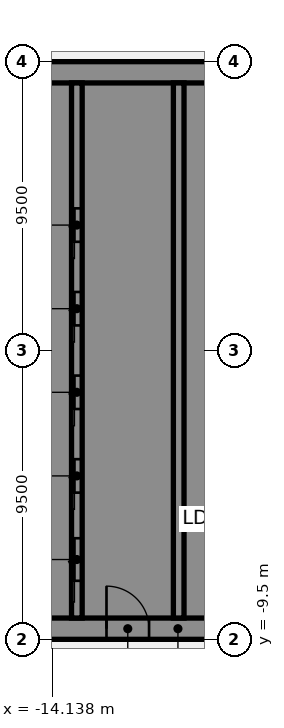
"""IFC4 building model, lengths in metres.
Left out: names, types, materials, properties, quantities, classifications, styles, units other than length and angle.
Written with IfcOpenShell. Run it as: python <this file> out.ifc"""

import sys

from ifc_helpers import new_model, si_unit, direction, frame, frame_2d, origin, place, context, subcontext, project, spatial, polyline, rectangle, outline, extrude, element, fill, save


model = new_model("IFC4")
c1 = context("Model", 3, precision=1e-05, world=origin(), true_north=direction((0.0, 1.0)))
c2 = subcontext(c1, "Body", "Model", "MODEL_VIEW")
j1 = project(units=[si_unit("LENGTHUNIT", "METRE"), si_unit("PLANEANGLEUNIT", "RADIAN")], contexts=[c1])
p1 = place(None, origin())
s1 = spatial("IfcSite", under=j1, at=p1, CompositionType="ELEMENT")
p2 = place(p1, origin())
s2 = spatial("IfcBuilding", under=s1, at=p2, CompositionType="ELEMENT")
p3 = place(p2, frame((0.0, 0.0, 15.0)))
s3 = spatial("IfcBuildingStorey", under=s2, at=p3, CompositionType="ELEMENT", Elevation=15.0)
p4 = place(p3, frame((-16.5, -9.15, 0.0), z_axis=(0.0, 0.0, 1.0), x_axis=(1.0, 0.0, 0.0)))
e1 = element("IfcWall", 1, at=p4, inside=s3, PredefinedType="SHEAR", context=c2, shape_type="SweptSolid", body=[
    extrude(rectangle(XDim=13.0, YDim=0.7, at=frame_2d((6.5, 0.0))), origin(), (0.0, 0.0, 1.0), 4.5),
])
p5 = place(p4, frame((4.15, 0.0, 0.0)))
e2 = element("IfcOpeningElement", 2, at=p5, cuts=e1, PredefinedType="OPENING", context=c2, shape_type="SweptSolid", body=[
    extrude(rectangle(XDim=1.4, YDim=2.1, at=frame_2d((0.7, 1.05))), frame((0.0, 0.36, 0.0), z_axis=(0.0, -1.0, 0.0), x_axis=(1.0, 0.0, 0.0)), (0.0, 0.0, 1.0), 0.72),
])
p6 = place(p4, frame((10.125, 0.0, 0.0)))
e3 = element("IfcOpeningElement", 3, at=p6, cuts=e1, PredefinedType="OPENING", context=c2, shape_type="SweptSolid", body=[
    extrude(rectangle(XDim=1.4, YDim=2.1, at=frame_2d((0.7, 1.05))), frame((0.0, 0.36, 0.0), z_axis=(0.0, -1.0, 0.0), x_axis=(1.0, 0.0, 0.0)), (0.0, 0.0, 1.0), 0.72),
])
p7 = place(p3, origin())
e4 = element("IfcWall", 4, at=p7, inside=s3, PredefinedType="SHEAR", context=c2, shape_type="SweptSolid", body=[
    extrude(outline(polyline([(-13.5, -8.8), (-13.5, -8.125), (-15.8, -8.125), (-15.8, -5.625), (-13.5, -5.625), (-13.5, -5.375), (-15.8, -5.375), (-15.8, -2.875), (-13.5, -2.875), (-13.5, -2.625), (-15.8, -2.625), (-15.8, -0.125), (-13.5, -0.125), (-13.5, 0.125), (-15.8, 0.125), (-15.8, 2.625), (-13.5, 2.625), (-13.5, 2.875), (-15.8, 2.875), (-15.8, 5.375), (-13.5, 5.375), (-13.5, 5.625), (-15.8, 5.625), (-15.8, 8.125), (-13.5, 8.125), (-13.5, 8.8), (-15.8, 8.8), (-16.5, 8.8), (-16.5, -8.8), (-15.8, -8.8), (-13.5, -8.8)])), origin(), (0.0, 0.0, 1.0), 4.5),
])
p8 = place(p3, frame((-16.5, 9.15, 0.0), z_axis=(0.0, 0.0, 1.0), x_axis=(1.0, 0.0, 0.0)))
e5 = element("IfcWall", 5, at=p8, inside=s3, PredefinedType="SHEAR", context=c2, shape_type="SweptSolid", body=[
    extrude(rectangle(XDim=13.0, YDim=0.7, at=frame_2d((6.5, 0.0))), origin(), (0.0, 0.0, 1.0), 4.5),
])
p9 = place(p3, origin())
e6 = element("IfcWall", 6, at=p9, inside=s3, PredefinedType="SHEAR", context=c2, shape_type="SweptSolid", body=[
    extrude(outline(polyline([(-9.8, -5.375), (-9.8, -5.625), (-7.5, -5.625), (-7.15, -5.625), (-7.15, 8.8), (-7.5, 8.8), (-9.8, 8.8), (-9.8, 8.125), (-7.5, 8.125), (-7.5, 5.625), (-9.8, 5.625), (-9.8, 5.375), (-7.5, 5.375), (-7.5, 2.875), (-9.8, 2.875), (-9.8, 2.625), (-7.5, 2.625), (-7.5, 0.125), (-9.8, 0.125), (-9.8, -0.125), (-7.5, -0.125), (-7.5, -2.625), (-9.8, -2.625), (-9.8, -2.875), (-7.5, -2.875), (-7.5, -5.375), (-9.8, -5.375)])), origin(), (0.0, 0.0, 1.0), 4.5),
])
p10 = place(p3, origin())
e7 = element("IfcWall", 7, at=p10, inside=s3, PredefinedType="SHEAR", context=c2, shape_type="SweptSolid", body=[
    extrude(outline(polyline([(-7.5, -8.125), (-9.55, -8.125), (-9.55, -5.625), (-9.8, -5.625), (-9.8, -8.125), (-9.8, -8.8), (-7.5, -8.8), (-7.5, -8.125)])), origin(), (0.0, 0.0, 1.0), 4.5),
])
p11 = place(p3, frame((-13.325, -8.8, 0.0), z_axis=(0.0, 0.0, 1.0), x_axis=(0.0, 1.0, 0.0)))
e8 = element("IfcWall", 8, at=p11, inside=s3, PredefinedType="SHEAR", context=c2, shape_type="SweptSolid", body=[
    extrude(rectangle(XDim=17.6, YDim=0.35, at=frame_2d((8.8, 0.0))), origin(), (0.0, 0.0, 1.0), 4.5),
])
p12 = place(p11, frame((1.225, 0.0, 0.0)))
e9 = element("IfcOpeningElement", 9, at=p12, cuts=e8, PredefinedType="OPENING", context=c2, shape_type="SweptSolid", body=[
    extrude(rectangle(XDim=1.4, YDim=2.1, at=frame_2d((0.7, 1.05))), frame((0.0, 0.185, 0.0), z_axis=(0.0, -1.0, 0.0), x_axis=(1.0, 0.0, 0.0)), (0.0, 0.0, 1.0), 0.37),
])
p13 = place(p11, frame((4.125, 0.0, 0.0)))
e10 = element("IfcOpeningElement", 10, at=p13, cuts=e8, PredefinedType="OPENING", context=c2, shape_type="SweptSolid", body=[
    extrude(rectangle(XDim=1.1, YDim=2.1, at=frame_2d((0.55, 1.05))), frame((0.0, 0.185, 0.0), z_axis=(0.0, -1.0, 0.0), x_axis=(1.0, 0.0, 0.0)), (0.0, 0.0, 1.0), 0.37),
])
p14 = place(p11, frame((6.875, 0.0, 0.0)))
e11 = element("IfcOpeningElement", 11, at=p14, cuts=e8, PredefinedType="OPENING", context=c2, shape_type="SweptSolid", body=[
    extrude(rectangle(XDim=1.1, YDim=2.1, at=frame_2d((0.55, 1.05))), frame((0.0, 0.185, 0.0), z_axis=(0.0, -1.0, 0.0), x_axis=(1.0, 0.0, 0.0)), (0.0, 0.0, 1.0), 0.37),
])
p15 = place(p11, frame((9.625, 0.0, 0.0)))
e12 = element("IfcOpeningElement", 12, at=p15, cuts=e8, PredefinedType="OPENING", context=c2, shape_type="SweptSolid", body=[
    extrude(rectangle(XDim=1.1, YDim=2.1, at=frame_2d((0.55, 1.05))), frame((0.0, 0.185, 0.0), z_axis=(0.0, -1.0, 0.0), x_axis=(1.0, 0.0, 0.0)), (0.0, 0.0, 1.0), 0.37),
])
p16 = place(p11, frame((12.375, 0.0, 0.0)))
e13 = element("IfcOpeningElement", 13, at=p16, cuts=e8, PredefinedType="OPENING", context=c2, shape_type="SweptSolid", body=[
    extrude(rectangle(XDim=1.1, YDim=2.1, at=frame_2d((0.55, 1.05))), frame((0.0, 0.185, 0.0), z_axis=(0.0, -1.0, 0.0), x_axis=(1.0, 0.0, 0.0)), (0.0, 0.0, 1.0), 0.37),
])
p17 = place(p3, frame((-9.975, -8.8, 0.0), z_axis=(0.0, 0.0, 1.0), x_axis=(0.0, 1.0, 0.0)))
e14 = element("IfcWall", 14, at=p17, inside=s3, PredefinedType="SHEAR", context=c2, shape_type="SweptSolid", body=[
    extrude(rectangle(XDim=17.6, YDim=0.35, at=frame_2d((8.8, 0.0))), origin(), (0.0, 0.0, 1.0), 4.5),
])
p18 = place(p5, origin())
e15 = element("IfcDoor", 15, at=p18, inside=s3, OperationType="SINGLE_SWING_LEFT", PredefinedType="DOOR", context=c2, shape_type="SweptSolid", body=[
    extrude(rectangle(XDim=1.4, YDim=2.1, at=frame_2d((0.7, 1.05))), frame((0.0, 0.025, 0.0), z_axis=(0.0, -1.0, 0.0), x_axis=(1.0, 0.0, 0.0)), (0.0, 0.0, 1.0), 0.05),
])
fill(e2, e15)
p19 = place(p12, origin())
e16 = element("IfcDoor", 16, at=p19, inside=s3, OperationType="SLIDING_TO_LEFT", PredefinedType="DOOR", context=c2, shape_type="SweptSolid", body=[
    extrude(rectangle(XDim=1.4, YDim=2.1, at=frame_2d((0.7, 1.05))), frame((0.0, 0.025, 0.0), z_axis=(0.0, -1.0, 0.0), x_axis=(1.0, 0.0, 0.0)), (0.0, 0.0, 1.0), 0.05),
])
fill(e9, e16)
p20 = place(p13, origin())
e17 = element("IfcDoor", 17, at=p20, inside=s3, OperationType="SLIDING_TO_LEFT", PredefinedType="DOOR", context=c2, shape_type="SweptSolid", body=[
    extrude(rectangle(XDim=1.1, YDim=2.1, at=frame_2d((0.55, 1.05))), frame((0.0, 0.025, 0.0), z_axis=(0.0, -1.0, 0.0), x_axis=(1.0, 0.0, 0.0)), (0.0, 0.0, 1.0), 0.05),
])
fill(e10, e17)
p21 = place(p14, origin())
e18 = element("IfcDoor", 18, at=p21, inside=s3, OperationType="SLIDING_TO_LEFT", PredefinedType="DOOR", context=c2, shape_type="SweptSolid", body=[
    extrude(rectangle(XDim=1.1, YDim=2.1, at=frame_2d((0.55, 1.05))), frame((0.0, 0.025, 0.0), z_axis=(0.0, -1.0, 0.0), x_axis=(1.0, 0.0, 0.0)), (0.0, 0.0, 1.0), 0.05),
])
fill(e11, e18)
p22 = place(p15, origin())
e19 = element("IfcDoor", 19, at=p22, inside=s3, OperationType="SLIDING_TO_LEFT", PredefinedType="DOOR", context=c2, shape_type="SweptSolid", body=[
    extrude(rectangle(XDim=1.1, YDim=2.1, at=frame_2d((0.55, 1.05))), frame((0.0, 0.025, 0.0), z_axis=(0.0, -1.0, 0.0), x_axis=(1.0, 0.0, 0.0)), (0.0, 0.0, 1.0), 0.05),
])
fill(e12, e19)
p23 = place(p16, origin())
e20 = element("IfcDoor", 20, at=p23, inside=s3, OperationType="SLIDING_TO_LEFT", PredefinedType="DOOR", context=c2, shape_type="SweptSolid", body=[
    extrude(rectangle(XDim=1.1, YDim=2.1, at=frame_2d((0.55, 1.05))), frame((0.0, 0.025, 0.0), z_axis=(0.0, -1.0, 0.0), x_axis=(1.0, 0.0, 0.0)), (0.0, 0.0, 1.0), 0.05),
])
fill(e13, e20)
save(model, sys.argv[1])
